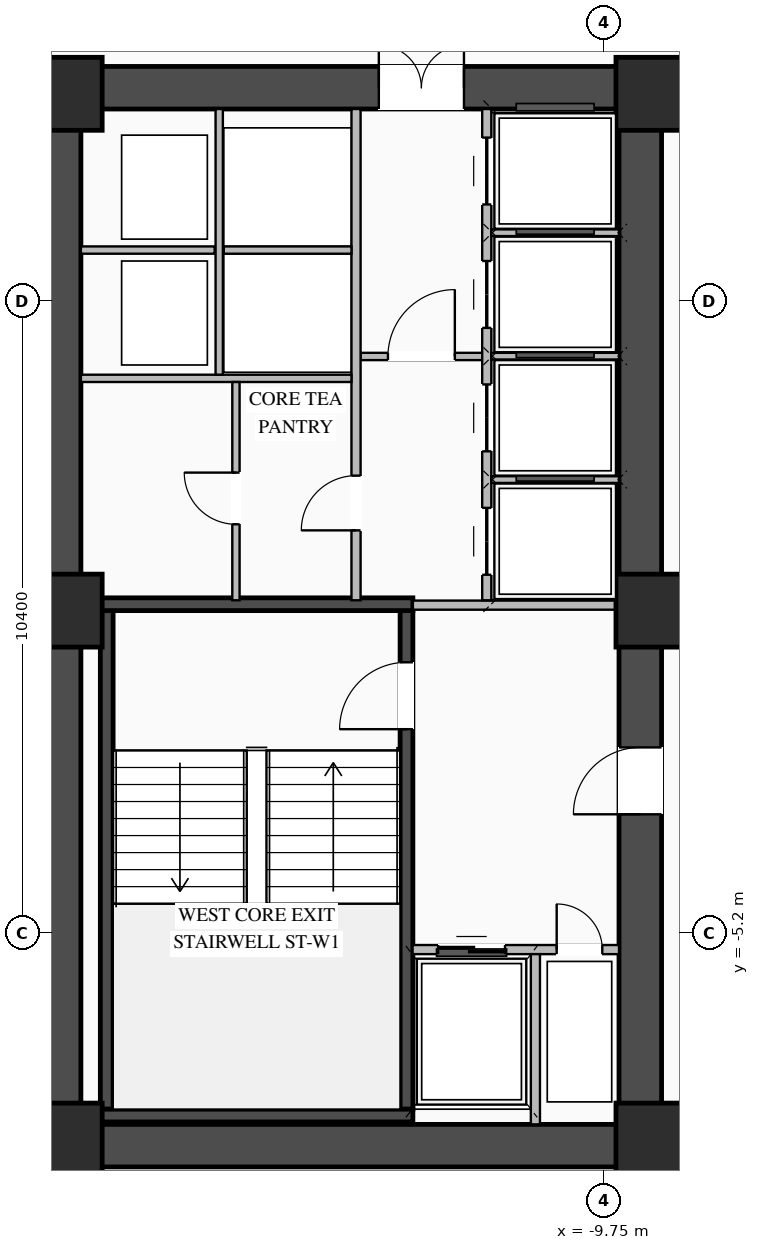
"""IFC4 building model, lengths in metres.
Left out: names, types, materials, properties, quantities, classifications, styles, units other than length and angle.
Written with IfcOpenShell. Run it as: python <this file> out.ifc"""

import sys

from ifc_helpers import new_model, si_unit, direction, frame, frame_2d, origin, origin_2d, place, context, subcontext, project, spatial, rectangle, extrude, element, fill, save


model = new_model("IFC4")
c1 = context("Model", 3, precision=1e-05, world=origin(), true_north=direction((0.0, 1.0)))
c2 = subcontext(c1, "Body", "Model", "MODEL_VIEW")
j1 = project(units=[si_unit("LENGTHUNIT", "METRE"), si_unit("PLANEANGLEUNIT", "RADIAN")], contexts=[c1])
p1 = place(None, origin())
s1 = spatial("IfcSite", under=j1, at=p1, CompositionType="ELEMENT")
p2 = place(p1, origin())
s2 = spatial("IfcBuilding", under=s1, at=p2, CompositionType="ELEMENT")
p3 = place(p2, frame((0.0, 0.0, 41.55)))
s3 = spatial("IfcBuildingStorey", under=s2, at=p3, CompositionType="ELEMENT", Elevation=41.55)
p4 = place(p3, frame((-19.05, -8.7, 0.0), z_axis=(0.0, 0.0, 1.0), x_axis=(1.0, 0.0, 0.0)))
e1 = element("IfcWall", 1, at=p4, inside=s3, PredefinedType="SHEAR", context=c2, shape_type="SweptSolid", body=[
    extrude(rectangle(XDim=10.25, YDim=0.7, at=frame_2d((5.125, 0.0))), origin(), (0.0, 0.0, 1.0), 3.27),
])
p5 = place(p3, frame((-19.05, 8.7, 0.0), z_axis=(0.0, 0.0, 1.0), x_axis=(1.0, 0.0, 0.0)))
e2 = element("IfcWall", 2, at=p5, inside=s3, PredefinedType="SHEAR", context=c2, shape_type="SweptSolid", body=[
    extrude(rectangle(XDim=10.25, YDim=0.7, at=frame_2d((5.125, 0.0))), origin(), (0.0, 0.0, 1.0), 3.27),
])
p6 = place(p5, frame((5.6, 0.0, 0.0)))
e3 = element("IfcOpeningElement", 3, at=p6, cuts=e2, PredefinedType="OPENING", context=c2, shape_type="SweptSolid", body=[
    extrude(rectangle(XDim=1.4, YDim=2.05, at=frame_2d((0.7, 1.025))), frame((0.0, 0.36, 0.0), z_axis=(0.0, -1.0, 0.0), x_axis=(1.0, 0.0, 0.0)), (0.0, 0.0, 1.0), 0.72),
])
p7 = place(p3, frame((-18.7, -8.35, 0.0), z_axis=(0.0, 0.0, 1.0), x_axis=(0.0, 1.0, 0.0)))
e4 = element("IfcWall", 4, at=p7, inside=s3, PredefinedType="SHEAR", context=c2, shape_type="SweptSolid", body=[
    extrude(rectangle(XDim=16.7, YDim=0.7, at=frame_2d((8.35, 0.0))), origin(), (0.0, 0.0, 1.0), 3.27),
])
p8 = place(p3, frame((-9.15, -8.35, 0.0), z_axis=(0.0, 0.0, 1.0), x_axis=(0.0, 1.0, 0.0)))
e5 = element("IfcWall", 5, at=p8, inside=s3, PredefinedType="SHEAR", context=c2, shape_type="SweptSolid", body=[
    extrude(rectangle(XDim=16.7, YDim=0.7, at=frame_2d((8.35, 0.0))), origin(), (0.0, 0.0, 1.0), 3.27),
])
p9 = place(p8, frame((5.1, 0.0, 0.0)))
e6 = element("IfcOpeningElement", 6, at=p9, cuts=e5, PredefinedType="OPENING", context=c2, shape_type="SweptSolid", body=[
    extrude(rectangle(XDim=1.1, YDim=2.08, at=frame_2d((0.55, 1.04))), frame((0.0, 0.36, 0.0), z_axis=(0.0, -1.0, 0.0), x_axis=(1.0, 0.0, 0.0)), (0.0, 0.0, 1.0), 0.72),
])
p10 = place(p3, frame((-12.995, -8.1, 0.0), z_axis=(0.0, 0.0, 1.0), x_axis=(0.0, 1.0, 0.0)))
e7 = element("IfcWall", 7, at=p10, inside=s3, PredefinedType="SHEAR", context=c2, shape_type="SweptSolid", body=[
    extrude(rectangle(XDim=8.2, YDim=0.21, at=frame_2d((4.1, 0.0))), origin(), (0.0, 0.0, 1.0), 3.27),
])
p11 = place(p10, frame((6.25, 0.0, 0.0)))
e8 = element("IfcOpeningElement", 8, at=p11, cuts=e7, PredefinedType="OPENING", context=c2, shape_type="SweptSolid", body=[
    extrude(rectangle(XDim=1.1, YDim=2.15, at=frame_2d((0.55, 1.075))), frame((0.0, 0.115, 0.0), z_axis=(0.0, -1.0, 0.0), x_axis=(1.0, 0.0, 0.0)), (0.0, 0.0, 1.0), 0.23),
])
p12 = place(p3, frame((-17.925, -8.1, 0.0), z_axis=(0.0, 0.0, 1.0), x_axis=(0.0, 1.0, 0.0)))
e9 = element("IfcWall", 9, at=p12, inside=s3, PredefinedType="SHEAR", context=c2, shape_type="SweptSolid", body=[
    extrude(rectangle(XDim=8.2, YDim=0.21, at=frame_2d((4.1, 0.0))), origin(), (0.0, 0.0, 1.0), 3.27),
])
for number, where, z_axis, x_axis in (
    (10, (-18.03, -8.205, 0.0), (0.0, 0.0, 1.0), (1.0, 0.0, 0.0)),
    (11, (-12.89, 0.205, 0.0), (0.0, 0.0, 1.0), (-1.0, 0.0, 0.0)),
):
    element("IfcWall", number, at=place(p3, frame(where, z_axis=z_axis, x_axis=x_axis)), inside=s3, PredefinedType="SHEAR", context=c2, shape_type="SweptSolid", body=[
        extrude(rectangle(XDim=5.14, YDim=0.21, at=frame_2d((2.57, 0.0))), origin(), (0.0, 0.0, 1.0), 3.27),
    ])
for number, where, z_axis, x_axis in (
    (12, (-8.95, -8.6, 0.0), (0.0, 0.0, 1.0), (1.0, 0.0, 0.0)),
    (13, (-8.95, 0.1, 0.0), (0.0, 0.0, 1.0), (1.0, 0.0, 0.0)),
    (14, (-8.95, 8.6, 0.0), (0.0, 0.0, 1.0), (1.0, 0.0, 0.0)),
    (15, (-18.6, -8.6, 0.0), (0.0, 0.0, 1.0), (1.0, 0.0, 0.0)),
    (16, (-18.6, 0.1, 0.0), (0.0, 0.0, 1.0), (1.0, 0.0, 0.0)),
    (17, (-18.6, 8.6, 0.0), (0.0, 0.0, 1.0), (1.0, 0.0, 0.0)),
):
    element("IfcColumn", number, at=place(p3, frame(where, z_axis=z_axis, x_axis=x_axis)), inside=s3, PredefinedType="COLUMN", context=c2, shape_type="SweptSolid", body=[
        extrude(rectangle(XDim=1.2, YDim=1.2, at=origin_2d()), origin(), (0.0, 0.0, 1.0), 3.45),
    ])
p13 = place(p3, frame((-12.895, -5.475, 0.0), z_axis=(0.0, 0.0, 1.0), x_axis=(1.0, 0.0, 0.0)))
e18 = element("IfcWall", 18, at=p13, inside=s3, PredefinedType="STANDARD", context=c2, shape_type="SweptSolid", body=[
    extrude(rectangle(XDim=3.395, YDim=0.15, at=frame_2d((1.698, 0.0))), origin(), (0.0, 0.0, 1.0), 3.25),
])
p14 = place(p13, frame((0.42, 0.0, 0.0)))
e19 = element("IfcOpeningElement", 19, at=p14, cuts=e18, PredefinedType="OPENING", context=c2, shape_type="SweptSolid", body=[
    extrude(rectangle(XDim=1.1, YDim=2.15, at=frame_2d((0.55, 1.075))), frame((0.0, 0.085, 0.0), z_axis=(0.0, -1.0, 0.0), x_axis=(1.0, 0.0, 0.0)), (0.0, 0.0, 1.0), 0.17),
])
p15 = place(p13, frame((2.37, 0.0, 0.0)))
e20 = element("IfcOpeningElement", 20, at=p15, cuts=e18, PredefinedType="OPENING", context=c2, shape_type="SweptSolid", body=[
    extrude(rectangle(XDim=0.75, YDim=2.05, at=frame_2d((0.375, 1.025))), frame((0.0, 0.085, 0.0), z_axis=(0.0, -1.0, 0.0), x_axis=(1.0, 0.0, 0.0)), (0.0, 0.0, 1.0), 0.17),
])
p16 = place(p3, frame((-10.875, -8.35, 0.0), z_axis=(0.0, 0.0, 1.0), x_axis=(0.0, 1.0, 0.0)))
e21 = element("IfcWall", 21, at=p16, inside=s3, PredefinedType="STANDARD", context=c2, shape_type="SweptSolid", body=[
    extrude(rectangle(XDim=2.8, YDim=0.15, at=frame_2d((1.4, 0.0))), origin(), (0.0, 0.0, 1.0), 3.25),
])
p17 = place(p3, frame((-12.89, 0.19, 0.0), z_axis=(0.0, 0.0, 1.0), x_axis=(1.0, 0.0, 0.0)))
e22 = element("IfcWall", 22, at=p17, inside=s3, PredefinedType="STANDARD", context=c2, shape_type="SweptSolid", body=[
    extrude(rectangle(XDim=3.39, YDim=0.15, at=frame_2d((1.695, 0.0))), origin(), (0.0, 0.0, 1.0), 2.645),
])
p18 = place(p3, frame((-13.75, 4.28, 0.0), z_axis=(0.0, 0.0, 1.0), x_axis=(1.0, 0.0, 0.0)))
e23 = element("IfcWall", 23, at=p18, inside=s3, PredefinedType="STANDARD", context=c2, shape_type="SweptSolid", body=[
    extrude(rectangle(XDim=2.0, YDim=0.12, at=frame_2d((1.0, 0.0))), origin(), (0.0, 0.0, 1.0), 3.25),
])
p19 = place(p18, frame((0.45, 0.0, 0.0)))
e24 = element("IfcOpeningElement", 24, at=p19, cuts=e23, PredefinedType="OPENING", context=c2, shape_type="SweptSolid", body=[
    extrude(rectangle(XDim=1.1, YDim=2.1, at=frame_2d((0.55, 1.05))), frame((0.0, 0.07, 0.0), z_axis=(0.0, -1.0, 0.0), x_axis=(1.0, 0.0, 0.0)), (0.0, 0.0, 1.0), 0.14),
])
p20 = place(p3, frame((-11.675, 0.27, 0.0), z_axis=(0.0, 0.0, 1.0), x_axis=(0.0, 1.0, 0.0)))
e25 = element("IfcWall", 25, at=p20, inside=s3, PredefinedType="STANDARD", context=c2, shape_type="SweptSolid", body=[
    extrude(rectangle(XDim=8.08, YDim=0.15, at=frame_2d((4.04, 0.0))), origin(), (0.0, 0.0, 1.0), 3.25),
])
p21 = place(p20, frame((0.42, 0.0, 0.0)))
e26 = element("IfcOpeningElement", 26, at=p21, cuts=e25, PredefinedType="OPENING", context=c2, shape_type="SweptSolid", body=[
    extrude(rectangle(XDim=1.1, YDim=2.1, at=frame_2d((0.55, 1.05))), frame((0.0, 0.085, 0.0), z_axis=(0.0, -1.0, 0.0), x_axis=(1.0, 0.0, 0.0)), (0.0, 0.0, 1.0), 0.17),
])
p22 = place(p20, frame((2.45, 0.0, 0.0)))
e27 = element("IfcOpeningElement", 27, at=p22, cuts=e25, PredefinedType="OPENING", context=c2, shape_type="SweptSolid", body=[
    extrude(rectangle(XDim=1.1, YDim=2.1, at=frame_2d((0.55, 1.05))), frame((0.0, 0.085, 0.0), z_axis=(0.0, -1.0, 0.0), x_axis=(1.0, 0.0, 0.0)), (0.0, 0.0, 1.0), 0.17),
])
p23 = place(p20, frame((4.48, 0.0, 0.0)))
e28 = element("IfcOpeningElement", 28, at=p23, cuts=e25, PredefinedType="OPENING", context=c2, shape_type="SweptSolid", body=[
    extrude(rectangle(XDim=1.1, YDim=2.1, at=frame_2d((0.55, 1.05))), frame((0.0, 0.085, 0.0), z_axis=(0.0, -1.0, 0.0), x_axis=(1.0, 0.0, 0.0)), (0.0, 0.0, 1.0), 0.17),
])
p24 = place(p20, frame((6.51, 0.0, 0.0)))
e29 = element("IfcOpeningElement", 29, at=p24, cuts=e25, PredefinedType="OPENING", context=c2, shape_type="SweptSolid", body=[
    extrude(rectangle(XDim=1.1, YDim=2.1, at=frame_2d((0.55, 1.05))), frame((0.0, 0.085, 0.0), z_axis=(0.0, -1.0, 0.0), x_axis=(1.0, 0.0, 0.0)), (0.0, 0.0, 1.0), 0.17),
])
for number, where, z_axis, x_axis in (
    (30, (-11.6, 2.255, 0.0), (0.0, 0.0, 1.0), (1.0, 0.0, 0.0)),
    (31, (-11.6, 4.285, 0.0), (0.0, 0.0, 1.0), (1.0, 0.0, 0.0)),
    (32, (-11.6, 6.315, 0.0), (0.0, 0.0, 1.0), (1.0, 0.0, 0.0)),
):
    element("IfcWall", number, at=place(p3, frame(where, z_axis=z_axis, x_axis=x_axis)), inside=s3, PredefinedType="STANDARD", context=c2, shape_type="SweptSolid", body=[
        extrude(rectangle(XDim=2.1, YDim=0.11, at=frame_2d((1.05, 0.0))), origin(), (0.0, 0.0, 1.0), 3.25),
    ])
p25 = place(p3, frame((-13.825, 0.27, 0.0), z_axis=(0.0, 0.0, 1.0), x_axis=(0.0, 1.0, 0.0)))
e33 = element("IfcWall", 33, at=p25, inside=s3, PredefinedType="STANDARD", context=c2, shape_type="SweptSolid", body=[
    extrude(rectangle(XDim=8.08, YDim=0.15, at=frame_2d((4.04, 0.0))), origin(), (0.0, 0.0, 1.0), 3.25),
])
p26 = place(p25, frame((1.15, 0.0, 0.0)))
e34 = element("IfcOpeningElement", 34, at=p26, cuts=e33, PredefinedType="OPENING", context=c2, shape_type="SweptSolid", body=[
    extrude(rectangle(XDim=0.9, YDim=2.05, at=frame_2d((0.45, 1.025))), frame((0.0, 0.085, 0.0), z_axis=(0.0, -1.0, 0.0), x_axis=(1.0, 0.0, 0.0)), (0.0, 0.0, 1.0), 0.17),
])
p27 = place(p3, frame((-18.35, 3.92, 0.0), z_axis=(0.0, 0.0, 1.0), x_axis=(1.0, 0.0, 0.0)))
e35 = element("IfcWall", 35, at=p27, inside=s3, PredefinedType="STANDARD", context=c2, shape_type="SweptSolid", body=[
    extrude(rectangle(XDim=4.45, YDim=0.12, at=frame_2d((2.225, 0.0))), origin(), (0.0, 0.0, 1.0), 3.25),
])
p28 = place(p3, frame((-18.35, 6.03, 0.0), z_axis=(0.0, 0.0, 1.0), x_axis=(1.0, 0.0, 0.0)))
e36 = element("IfcWall", 36, at=p28, inside=s3, PredefinedType="STANDARD", context=c2, shape_type="SweptSolid", body=[
    extrude(rectangle(XDim=2.2, YDim=0.12, at=frame_2d((1.1, 0.0))), origin(), (0.0, 0.0, 1.0), 3.25),
])
p29 = place(p3, frame((-16.075, 3.98, 0.0), z_axis=(0.0, 0.0, 1.0), x_axis=(0.0, 1.0, 0.0)))
e37 = element("IfcWall", 37, at=p29, inside=s3, PredefinedType="STANDARD", context=c2, shape_type="SweptSolid", body=[
    extrude(rectangle(XDim=4.37, YDim=0.12, at=frame_2d((2.185, 0.0))), origin(), (0.0, 0.0, 1.0), 3.25),
])
p30 = place(p3, frame((-16.0, 6.03, 0.0), z_axis=(0.0, 0.0, 1.0), x_axis=(1.0, 0.0, 0.0)))
e38 = element("IfcWall", 38, at=p30, inside=s3, PredefinedType="STANDARD", context=c2, shape_type="SweptSolid", body=[
    extrude(rectangle(XDim=2.1, YDim=0.12, at=frame_2d((1.05, 0.0))), origin(), (0.0, 0.0, 1.0), 3.25),
])
p31 = place(p3, frame((-15.8, 0.27, 0.0), z_axis=(0.0, 0.0, 1.0), x_axis=(0.0, 1.0, 0.0)))
e39 = element("IfcWall", 39, at=p31, inside=s3, PredefinedType="STANDARD", context=c2, shape_type="SweptSolid", body=[
    extrude(rectangle(XDim=3.59, YDim=0.12, at=frame_2d((1.795, 0.0))), origin(), (0.0, 0.0, 1.0), 3.25),
])
p32 = place(p31, frame((1.25, 0.0, 0.0)))
e40 = element("IfcOpeningElement", 40, at=p32, cuts=e39, PredefinedType="OPENING", context=c2, shape_type="SweptSolid", body=[
    extrude(rectangle(XDim=0.85, YDim=2.05, at=frame_2d((0.425, 1.025))), frame((0.0, 0.07, 0.0), z_axis=(0.0, -1.0, 0.0), x_axis=(1.0, 0.0, 0.0)), (0.0, 0.0, 1.0), 0.14),
])
p33 = place(p11, origin())
e41 = element("IfcDoor", 41, at=p33, inside=s3, OperationType="SINGLE_SWING_LEFT", PredefinedType="DOOR", context=c2, shape_type="SweptSolid", body=[
    extrude(rectangle(XDim=1.1, YDim=2.15, at=frame_2d((0.55, 1.075))), frame((0.0, 0.025, 0.0), z_axis=(0.0, -1.0, 0.0), x_axis=(1.0, 0.0, 0.0)), (0.0, 0.0, 1.0), 0.05),
])
fill(e8, e41)
p34 = place(p14, origin())
e42 = element("IfcDoor", 42, at=p34, inside=s3, OperationType="DOUBLE_DOOR_SLIDING", PredefinedType="DOOR", context=c2, shape_type="SweptSolid", body=[
    extrude(rectangle(XDim=1.1, YDim=2.15, at=frame_2d((0.55, 1.075))), frame((0.0, 0.025, 0.0), z_axis=(0.0, -1.0, 0.0), x_axis=(1.0, 0.0, 0.0)), (0.0, 0.0, 1.0), 0.05),
])
fill(e19, e42)
p35 = place(p15, origin())
e43 = element("IfcDoor", 43, at=p35, inside=s3, OperationType="SINGLE_SWING_LEFT", PredefinedType="DOOR", context=c2, shape_type="SweptSolid", body=[
    extrude(rectangle(XDim=0.75, YDim=2.05, at=frame_2d((0.375, 1.025))), frame((0.0, 0.025, 0.0), z_axis=(0.0, -1.0, 0.0), x_axis=(1.0, 0.0, 0.0)), (0.0, 0.0, 1.0), 0.05),
])
fill(e20, e43)
p36 = place(p9, origin())
e44 = element("IfcDoor", 44, at=p36, inside=s3, OperationType="SINGLE_SWING_LEFT", PredefinedType="DOOR", context=c2, shape_type="SweptSolid", body=[
    extrude(rectangle(XDim=1.1, YDim=2.08, at=frame_2d((0.55, 1.04))), frame((0.0, 0.305, 0.0), z_axis=(0.0, -1.0, 0.0), x_axis=(1.0, 0.0, 0.0)), (0.0, 0.0, 1.0), 0.05),
])
fill(e6, e44)
p37 = place(p19, origin())
e45 = element("IfcDoor", 45, at=p37, inside=s3, OperationType="SINGLE_SWING_RIGHT", PredefinedType="DOOR", context=c2, shape_type="SweptSolid", body=[
    extrude(rectangle(XDim=1.1, YDim=2.1, at=frame_2d((0.55, 1.05))), frame((0.0, 0.025, 0.0), z_axis=(0.0, -1.0, 0.0), x_axis=(1.0, 0.0, 0.0)), (0.0, 0.0, 1.0), 0.05),
])
fill(e24, e45)
p38 = place(p6, origin())
e46 = element("IfcDoor", 46, at=p38, inside=s3, OperationType="DOUBLE_DOOR_SINGLE_SWING", PredefinedType="DOOR", context=c2, shape_type="SweptSolid", body=[
    extrude(rectangle(XDim=1.4, YDim=2.05, at=frame_2d((0.7, 1.025))), frame((0.0, 0.295, 0.0), z_axis=(0.0, -1.0, 0.0), x_axis=(1.0, 0.0, 0.0)), (0.0, 0.0, 1.0), 0.05),
])
fill(e3, e46)
p39 = place(p21, origin())
e47 = element("IfcDoor", 47, at=p39, inside=s3, OperationType="DOUBLE_DOOR_SLIDING", PredefinedType="DOOR", context=c2, shape_type="SweptSolid", body=[
    extrude(rectangle(XDim=1.1, YDim=2.1, at=frame_2d((0.55, 1.05))), frame((0.0, 0.025, 0.0), z_axis=(0.0, -1.0, 0.0), x_axis=(1.0, 0.0, 0.0)), (0.0, 0.0, 1.0), 0.05),
])
fill(e26, e47)
p40 = place(p22, origin())
e48 = element("IfcDoor", 48, at=p40, inside=s3, OperationType="DOUBLE_DOOR_SLIDING", PredefinedType="DOOR", context=c2, shape_type="SweptSolid", body=[
    extrude(rectangle(XDim=1.1, YDim=2.1, at=frame_2d((0.55, 1.05))), frame((0.0, 0.025, 0.0), z_axis=(0.0, -1.0, 0.0), x_axis=(1.0, 0.0, 0.0)), (0.0, 0.0, 1.0), 0.05),
])
fill(e27, e48)
p41 = place(p23, origin())
e49 = element("IfcDoor", 49, at=p41, inside=s3, OperationType="DOUBLE_DOOR_SLIDING", PredefinedType="DOOR", context=c2, shape_type="SweptSolid", body=[
    extrude(rectangle(XDim=1.1, YDim=2.1, at=frame_2d((0.55, 1.05))), frame((0.0, 0.025, 0.0), z_axis=(0.0, -1.0, 0.0), x_axis=(1.0, 0.0, 0.0)), (0.0, 0.0, 1.0), 0.05),
])
fill(e28, e49)
p42 = place(p24, origin())
e50 = element("IfcDoor", 50, at=p42, inside=s3, OperationType="DOUBLE_DOOR_SLIDING", PredefinedType="DOOR", context=c2, shape_type="SweptSolid", body=[
    extrude(rectangle(XDim=1.1, YDim=2.1, at=frame_2d((0.55, 1.05))), frame((0.0, 0.025, 0.0), z_axis=(0.0, -1.0, 0.0), x_axis=(1.0, 0.0, 0.0)), (0.0, 0.0, 1.0), 0.05),
])
fill(e29, e50)
p43 = place(p26, origin())
e51 = element("IfcDoor", 51, at=p43, inside=s3, OperationType="SINGLE_SWING_LEFT", PredefinedType="DOOR", context=c2, shape_type="SweptSolid", body=[
    extrude(rectangle(XDim=0.9, YDim=2.05, at=frame_2d((0.45, 1.025))), frame((0.0, 0.025, 0.0), z_axis=(0.0, -1.0, 0.0), x_axis=(1.0, 0.0, 0.0)), (0.0, 0.0, 1.0), 0.05),
])
fill(e34, e51)
p44 = place(p32, origin())
e52 = element("IfcDoor", 52, at=p44, inside=s3, OperationType="SINGLE_SWING_RIGHT", PredefinedType="DOOR", context=c2, shape_type="SweptSolid", body=[
    extrude(rectangle(XDim=0.85, YDim=2.05, at=frame_2d((0.425, 1.025))), frame((0.0, 0.025, 0.0), z_axis=(0.0, -1.0, 0.0), x_axis=(1.0, 0.0, 0.0)), (0.0, 0.0, 1.0), 0.05),
])
fill(e40, e52)
save(model, sys.argv[1])
